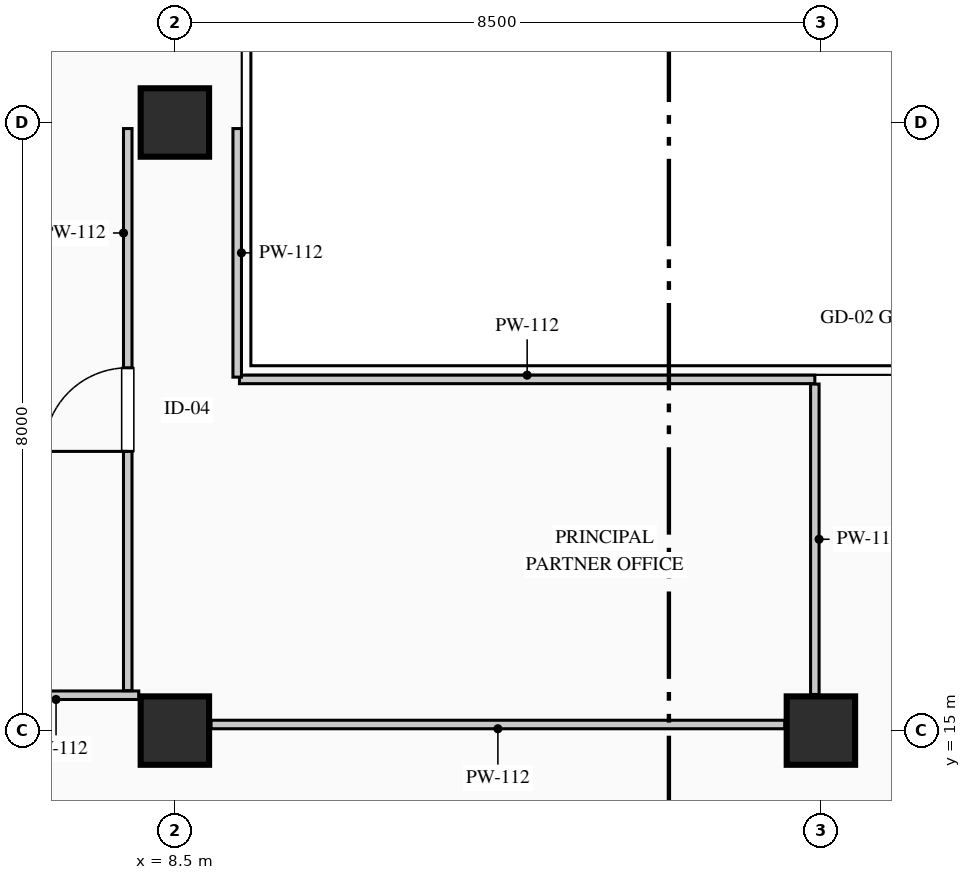
"""IFC4 building model, lengths in metres.
Left out: names, types, materials, properties, quantities, classifications, styles, units other than length and angle.
Written with IfcOpenShell. Run it as: python <this file> out.ifc"""

import sys

from ifc_helpers import new_model, si_unit, direction, frame, frame_2d, origin, origin_2d, place, context, subcontext, project, spatial, rectangle, extrude, element, fill, save


model = new_model("IFC4")
c1 = context("Model", 3, precision=1e-05, world=origin(), true_north=direction((0.0, 1.0)))
c2 = subcontext(c1, "Body", "Model", "MODEL_VIEW")
j1 = project(units=[si_unit("LENGTHUNIT", "METRE"), si_unit("PLANEANGLEUNIT", "RADIAN")], contexts=[c1])
p1 = place(None, origin())
s1 = spatial("IfcSite", under=j1, at=p1, CompositionType="ELEMENT")
p2 = place(p1, origin())
s2 = spatial("IfcBuilding", under=s1, at=p2, CompositionType="ELEMENT")
p3 = place(p2, frame((0.0, 0.0, 235.1)))
s3 = spatial("IfcBuildingStorey", under=s2, at=p3, CompositionType="ELEMENT", Elevation=235.1)
for number, where, z_axis, x_axis in (
    (1, (8.5, 15.0, 0.0), (0.0, 0.0, 1.0), (1.0, 0.0, 0.0)),
    (2, (8.5, 23.0, 0.0), (0.0, 0.0, 1.0), (1.0, 0.0, 0.0)),
    (3, (17.0, 15.0, 0.0), (0.0, 0.0, 1.0), (1.0, 0.0, 0.0)),
):
    element("IfcColumn", number, at=place(p3, frame(where, z_axis=z_axis, x_axis=x_axis)), inside=s3, PredefinedType="COLUMN", context=c2, shape_type="SweptSolid", body=[
        extrude(rectangle(XDim=0.9, YDim=0.9, at=origin_2d()), origin(), (0.0, 0.0, 1.0), 3.95),
    ])
p4 = place(p3, frame((6.933, 4.52, 0.0), z_axis=(0.0, 0.0, 1.0), x_axis=(-0.109965284523, 0.993935428587, 0.0)))
e4 = element("IfcWall", 4, at=p4, inside=s3, PredefinedType="STANDARD", context=c2, shape_type="SweptSolid", body=[
    extrude(rectangle(XDim=37.186, YDim=0.24, at=frame_2d((18.593, 0.0))), origin(), (0.0, 0.0, 1.0), 3.7),
])
p5 = place(p4, frame((12.562, 0.0, 0.9)))
e5 = element("IfcOpeningElement", 5, at=p5, cuts=e4, PredefinedType="OPENING", context=c2, shape_type="SweptSolid", body=[
    extrude(rectangle(XDim=1.65, YDim=1.95, at=frame_2d((0.825, 0.975))), frame((0.0, 0.13, 0.0), z_axis=(0.0, -1.0, 0.0), x_axis=(1.0, 0.0, 0.0)), (0.0, 0.0, 1.0), 0.26),
])
p6 = place(p3, frame((9.35, 19.62, 0.0), z_axis=(0.0, 0.0, 1.0), x_axis=(1.0, 0.0, 0.0)))
e6 = element("IfcWall", 6, at=p6, inside=s3, PredefinedType="PARTITIONING", context=c2, shape_type="SweptSolid", body=[
    extrude(rectangle(XDim=7.57, YDim=0.112, at=frame_2d((3.785, 0.0))), origin(), (0.0, 0.0, 1.0), 3.7),
])
p7 = place(p3, frame((16.92, 19.559, 0.0), z_axis=(0.0, 0.0, 1.0), x_axis=(0.0, -1.0, 0.0)))
e7 = element("IfcWall", 7, at=p7, inside=s3, PredefinedType="PARTITIONING", context=c2, shape_type="SweptSolid", body=[
    extrude(rectangle(XDim=4.084, YDim=0.112, at=frame_2d((2.042, 0.0))), origin(), (0.0, 0.0, 1.0), 3.7),
])
p8 = place(p3, frame((16.525, 15.08, 0.0), z_axis=(0.0, 0.0, 1.0), x_axis=(-1.0, 0.0, 0.0)))
e8 = element("IfcWall", 8, at=p8, inside=s3, PredefinedType="PARTITIONING", context=c2, shape_type="SweptSolid", body=[
    extrude(rectangle(XDim=7.55, YDim=0.112, at=frame_2d((3.775, 0.0))), origin(), (0.0, 0.0, 1.0), 3.185),
])
p9 = place(p3, frame((8.025, 15.465, 0.0), z_axis=(0.0, 0.0, 1.0), x_axis=(-1.0, 0.0, 0.0)))
e9 = element("IfcWall", 9, at=p9, inside=s3, PredefinedType="PARTITIONING", context=c2, shape_type="SweptSolid", body=[
    extrude(rectangle(XDim=2.177, YDim=0.112, at=frame_2d((1.088, 0.0))), origin(), (0.0, 0.0, 1.0), 3.7),
])
p10 = place(p3, frame((7.88, 15.526, 0.0), z_axis=(0.0, 0.0, 1.0), x_axis=(0.0, 1.0, 0.0)))
e10 = element("IfcWall", 10, at=p10, inside=s3, PredefinedType="PARTITIONING", context=c2, shape_type="SweptSolid", body=[
    extrude(rectangle(XDim=7.394, YDim=0.112, at=frame_2d((3.697, 0.0))), origin(), (0.0, 0.0, 1.0), 3.7),
])
p11 = place(p10, frame((3.147, 0.0, 0.0)))
e11 = element("IfcOpeningElement", 11, at=p11, cuts=e10, PredefinedType="OPENING", context=c2, shape_type="SweptSolid", body=[
    extrude(rectangle(XDim=1.1, YDim=2.2, at=frame_2d((0.55, 1.1))), frame((0.0, 0.066, 0.0), z_axis=(0.0, -1.0, 0.0), x_axis=(1.0, 0.0, 0.0)), (0.0, 0.0, 1.0), 0.132),
])
p12 = place(p3, frame((9.32, 22.92, 0.0), z_axis=(0.0, 0.0, 1.0), x_axis=(0.0, -1.0, 0.0)))
e12 = element("IfcWall", 12, at=p12, inside=s3, PredefinedType="PARTITIONING", context=c2, shape_type="SweptSolid", body=[
    extrude(rectangle(XDim=3.27, YDim=0.112, at=frame_2d((1.635, 0.0))), origin(), (0.0, 0.0, 1.0), 3.325),
])
p13 = place(p11, origin())
e13 = element("IfcDoor", 13, at=p13, inside=s3, OperationType="SINGLE_SWING_LEFT", PredefinedType="DOOR", context=c2, shape_type="SweptSolid", body=[
    extrude(rectangle(XDim=1.1, YDim=2.2, at=frame_2d((0.55, 1.1))), frame((0.0, 0.025, 0.0), z_axis=(0.0, -1.0, 0.0), x_axis=(1.0, 0.0, 0.0)), (0.0, 0.0, 1.0), 0.05),
])
fill(e11, e13)
save(model, sys.argv[1])
